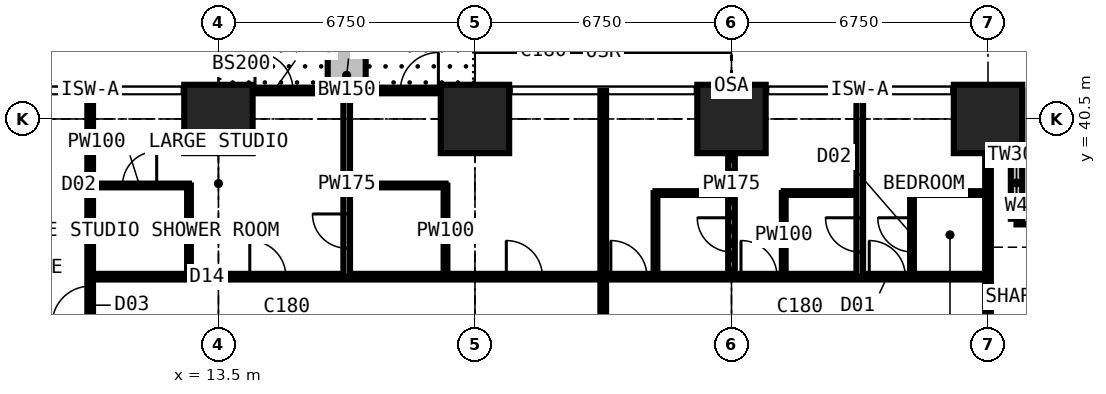
"""IFC4 building model, lengths in metres.
Left out: names, types, materials, properties, quantities, classifications, styles, units other than length and angle.
Written with IfcOpenShell. Run it as: python <this file> out.ifc"""

import sys

from ifc_helpers import new_model, si_unit, direction, frame, frame_2d, origin, origin_2d, place, context, subcontext, project, spatial, rectangle, extrude, element, fill, save


model = new_model("IFC4")
c1 = context("Model", 3, precision=1e-05, world=origin(), true_north=direction((0.0, 1.0)))
c2 = subcontext(c1, "Body", "Model", "MODEL_VIEW")
j1 = project(units=[si_unit("LENGTHUNIT", "METRE"), si_unit("PLANEANGLEUNIT", "RADIAN")], contexts=[c1])
p1 = place(None, origin())
s1 = spatial("IfcSite", under=j1, at=p1, CompositionType="ELEMENT")
p2 = place(p1, origin())
s2 = spatial("IfcBuilding", under=s1, at=p2, CompositionType="ELEMENT")
p3 = place(p2, frame((0.0, 0.0, 54.0)))
s3 = spatial("IfcBuildingStorey", under=s2, at=p3, CompositionType="ELEMENT", Elevation=54.0)
for number, where, z_axis, x_axis in (
    (1, (13.5, 40.5, 0.0), (0.0, 0.0, 1.0), (1.0, 0.0, 0.0)),
    (2, (20.25, 40.5, 0.0), (0.0, 0.0, 1.0), (1.0, 0.0, 0.0)),
    (3, (27.0, 40.5, 0.0), (0.0, 0.0, 1.0), (1.0, 0.0, 0.0)),
    (4, (33.75, 40.5, 0.0), (0.0, 0.0, 1.0), (1.0, 0.0, 0.0)),
):
    element("IfcColumn", number, at=place(p3, frame(where, z_axis=z_axis, x_axis=x_axis)), inside=s3, PredefinedType="COLUMN", context=c2, shape_type="SweptSolid", body=[
        extrude(rectangle(XDim=1.8, YDim=1.8, at=origin_2d()), origin(), (0.0, 0.0, 1.0), 3.6),
    ])
p4 = place(p3, frame((37.875, 37.875, 0.0), z_axis=(0.0, 0.0, 1.0), x_axis=(-1.0, 0.0, 0.0)))
e5 = element("IfcWall", 5, at=p4, inside=s3, PredefinedType="SOLIDWALL", context=c2, shape_type="SweptSolid", body=[
    extrude(rectangle(XDim=3.375, YDim=0.3, at=frame_2d((1.688, 0.0))), origin(), (0.0, 0.0, 1.0), 3.375),
])
p5 = place(p4, frame((0.788, 0.0, 0.6)))
e6 = element("IfcOpeningElement", 6, at=p5, cuts=e5, PredefinedType="OPENING", context=c2, shape_type="SweptSolid", body=[
    extrude(rectangle(XDim=1.8, YDim=2.1, at=frame_2d((0.9, 1.05))), frame((0.0, 0.16, 0.0), z_axis=(0.0, -1.0, 0.0), x_axis=(1.0, 0.0, 0.0)), (0.0, 0.0, 1.0), 0.32),
])
p6 = place(p3, frame((34.5, 37.875, 0.0), z_axis=(0.0, 0.0, 1.0), x_axis=(0.0, 1.0, 0.0)))
e7 = element("IfcWall", 7, at=p6, inside=s3, PredefinedType="SOLIDWALL", context=c2, shape_type="SweptSolid", body=[
    extrude(rectangle(XDim=3.375, YDim=0.3, at=frame_2d((1.688, 0.0))), origin(), (0.0, 0.0, 1.0), 3.375),
])
p7 = place(p6, frame((0.343, 0.0, 0.9)))
e8 = element("IfcOpeningElement", 8, at=p7, cuts=e7, PredefinedType="OPENING", context=c2, shape_type="SweptSolid", body=[
    extrude(rectangle(XDim=1.2, YDim=1.8, at=frame_2d((0.6, 0.9))), frame((0.0, 0.16, 0.0), z_axis=(0.0, -1.0, 0.0), x_axis=(1.0, 0.0, 0.0)), (0.0, 0.0, 1.0), 0.32),
])
p8 = place(p3, frame((13.5, 41.25, 0.0), z_axis=(0.0, 0.0, 1.0), x_axis=(1.0, 0.0, 0.0)))
e9 = element("IfcWall", 9, at=p8, inside=s3, PredefinedType="SOLIDWALL", context=c2, shape_type="SweptSolid", body=[
    extrude(rectangle(XDim=6.75, YDim=0.15, at=frame_2d((3.375, 0.0))), origin(), (0.0, 0.0, 1.0), 3.375),
])
p9 = place(p8, frame((0.962, 0.0, 0.0)))
e10 = element("IfcOpeningElement", 10, at=p9, cuts=e9, PredefinedType="OPENING", context=c2, shape_type="SweptSolid", body=[
    extrude(rectangle(XDim=1.0, YDim=2.2, at=frame_2d((0.5, 1.1))), frame((0.0, 0.085, 0.0), z_axis=(0.0, -1.0, 0.0), x_axis=(1.0, 0.0, 0.0)), (0.0, 0.0, 1.0), 0.17),
])
p10 = place(p8, frame((2.025, 0.0, 0.9)))
e11 = element("IfcOpeningElement", 11, at=p10, cuts=e9, PredefinedType="OPENING", context=c2, shape_type="SweptSolid", body=[
    extrude(rectangle(XDim=1.2, YDim=1.8, at=frame_2d((0.6, 0.9))), frame((0.0, 0.085, 0.0), z_axis=(0.0, -1.0, 0.0), x_axis=(1.0, 0.0, 0.0)), (0.0, 0.0, 1.0), 0.17),
])
p11 = place(p8, frame((4.788, 0.0, 0.0)))
e12 = element("IfcOpeningElement", 12, at=p11, cuts=e9, PredefinedType="OPENING", context=c2, shape_type="SweptSolid", body=[
    extrude(rectangle(XDim=1.0, YDim=2.2, at=frame_2d((0.5, 1.1))), frame((0.0, 0.085, 0.0), z_axis=(0.0, -1.0, 0.0), x_axis=(1.0, 0.0, 0.0)), (0.0, 0.0, 1.0), 0.17),
])
p12 = place(p8, frame((3.525, 0.0, 0.9)))
e13 = element("IfcOpeningElement", 13, at=p12, cuts=e9, PredefinedType="OPENING", context=c2, shape_type="SweptSolid", body=[
    extrude(rectangle(XDim=1.2, YDim=1.8, at=frame_2d((0.6, 0.9))), frame((0.0, 0.085, 0.0), z_axis=(0.0, -1.0, 0.0), x_axis=(1.0, 0.0, 0.0)), (0.0, 0.0, 1.0), 0.17),
])
p13 = place(p3, frame((16.875, 41.35, 0.0), z_axis=(0.0, 0.0, 1.0), x_axis=(0.0, 1.0, 0.0)))
e14 = element("IfcWall", 14, at=p13, inside=s3, PredefinedType="USERDEFINED", context=c2, shape_type="SweptSolid", body=[
    extrude(rectangle(XDim=2.2, YDim=1.0, at=frame_2d((1.1, 0.0))), origin(), (0.0, 0.0, 1.0), 0.9),
])
p14 = place(p3, frame((10.125, 30.375, 0.0), z_axis=(0.0, 0.0, 1.0), x_axis=(0.0, 1.0, 0.0)))
e15 = element("IfcWall", 15, at=p14, inside=s3, PredefinedType="PARTITIONING", context=c2, shape_type="SweptSolid", body=[
    extrude(rectangle(XDim=10.859, YDim=0.15, at=frame_2d((5.429, 0.0))), origin(), (0.0, 0.0, 1.0), 3.375),
])
p15 = place(p14, frame((4.725, 0.0, 0.0)))
e16 = element("IfcOpeningElement", 16, at=p15, cuts=e15, PredefinedType="OPENING", context=c2, shape_type="SweptSolid", body=[
    extrude(rectangle(XDim=1.0, YDim=2.2, at=frame_2d((0.5, 1.1))), frame((0.0, 0.085, 0.0), z_axis=(0.0, -1.0, 0.0), x_axis=(1.0, 0.0, 0.0)), (0.0, 0.0, 1.0), 0.17),
])
p16 = place(p3, frame((10.125, 36.35, 0.0), z_axis=(0.0, 0.0, 1.0), x_axis=(1.0, 0.0, 0.0)))
e17 = element("IfcWall", 17, at=p16, inside=s3, PredefinedType="PARTITIONING", context=c2, shape_type="SweptSolid", body=[
    extrude(rectangle(XDim=23.625, YDim=0.15, at=frame_2d((11.812, 0.0))), origin(), (0.0, 0.0, 1.0), 3.375),
])
p17 = place(p16, frame((20.5, 0.0, 0.0)))
e18 = element("IfcOpeningElement", 18, at=p17, cuts=e17, PredefinedType="OPENING", context=c2, shape_type="SweptSolid", body=[
    extrude(rectangle(XDim=0.95, YDim=2.2, at=frame_2d((0.475, 1.1))), frame((0.0, 0.085, 0.0), z_axis=(0.0, -1.0, 0.0), x_axis=(1.0, 0.0, 0.0)), (0.0, 0.0, 1.0), 0.17),
])
p18 = place(p16, frame((17.125, 0.0, 0.0)))
e19 = element("IfcOpeningElement", 19, at=p18, cuts=e17, PredefinedType="OPENING", context=c2, shape_type="SweptSolid", body=[
    extrude(rectangle(XDim=0.95, YDim=2.2, at=frame_2d((0.475, 1.1))), frame((0.0, 0.085, 0.0), z_axis=(0.0, -1.0, 0.0), x_axis=(1.0, 0.0, 0.0)), (0.0, 0.0, 1.0), 0.17),
])
p19 = place(p16, frame((13.7, 0.0, 0.0)))
e20 = element("IfcOpeningElement", 20, at=p19, cuts=e17, PredefinedType="OPENING", context=c2, shape_type="SweptSolid", body=[
    extrude(rectangle(XDim=0.95, YDim=2.2, at=frame_2d((0.475, 1.1))), frame((0.0, 0.085, 0.0), z_axis=(0.0, -1.0, 0.0), x_axis=(1.0, 0.0, 0.0)), (0.0, 0.0, 1.0), 0.17),
])
p20 = place(p16, frame((4.2, 0.0, 0.0)))
e21 = element("IfcOpeningElement", 21, at=p20, cuts=e17, PredefinedType="OPENING", context=c2, shape_type="SweptSolid", body=[
    extrude(rectangle(XDim=0.95, YDim=2.2, at=frame_2d((0.475, 1.1))), frame((0.0, 0.085, 0.0), z_axis=(0.0, -1.0, 0.0), x_axis=(1.0, 0.0, 0.0)), (0.0, 0.0, 1.0), 0.17),
])
p21 = place(p16, frame((10.95, 0.0, 0.0)))
e22 = element("IfcOpeningElement", 22, at=p21, cuts=e17, PredefinedType="OPENING", context=c2, shape_type="SweptSolid", body=[
    extrude(rectangle(XDim=0.95, YDim=2.2, at=frame_2d((0.475, 1.1))), frame((0.0, 0.085, 0.0), z_axis=(0.0, -1.0, 0.0), x_axis=(1.0, 0.0, 0.0)), (0.0, 0.0, 1.0), 0.17),
])
p22 = place(p3, frame((10.125, 38.75, 0.0), z_axis=(0.0, 0.0, 1.0), x_axis=(1.0, 0.0, 0.0)))
e23 = element("IfcWall", 23, at=p22, inside=s3, PredefinedType="PARTITIONING", context=c2, shape_type="SweptSolid", body=[
    extrude(rectangle(XDim=2.6, YDim=0.1, at=frame_2d((1.3, 0.0))), origin(), (0.0, 0.0, 1.0), 3.375),
])
p23 = place(p22, frame((0.85, 0.0, 0.0)))
e24 = element("IfcOpeningElement", 24, at=p23, cuts=e23, PredefinedType="OPENING", context=c2, shape_type="SweptSolid", body=[
    extrude(rectangle(XDim=0.9, YDim=2.2, at=frame_2d((0.45, 1.1))), frame((0.0, 0.06, 0.0), z_axis=(0.0, -1.0, 0.0), x_axis=(1.0, 0.0, 0.0)), (0.0, 0.0, 1.0), 0.12),
])
p24 = place(p3, frame((12.725, 36.35, 0.0), z_axis=(0.0, 0.0, 1.0), x_axis=(0.0, 1.0, 0.0)))
e25 = element("IfcWall", 25, at=p24, inside=s3, PredefinedType="PARTITIONING", context=c2, shape_type="SweptSolid", body=[
    extrude(rectangle(XDim=2.4, YDim=0.1, at=frame_2d((1.2, 0.0))), origin(), (0.0, 0.0, 1.0), 3.375),
])
p25 = place(p3, frame((16.875, 36.35, 0.0), z_axis=(0.0, 0.0, 1.0), x_axis=(0.0, 1.0, 0.0)))
e26 = element("IfcWall", 26, at=p25, inside=s3, PredefinedType="PARTITIONING", context=c2, shape_type="SweptSolid", body=[
    extrude(rectangle(XDim=4.884, YDim=0.175, at=frame_2d((2.442, 0.0))), origin(), (0.0, 0.0, 1.0), 3.375),
])
p26 = place(p25, frame((0.75, 0.0, 0.0)))
e27 = element("IfcOpeningElement", 27, at=p26, cuts=e26, PredefinedType="OPENING", context=c2, shape_type="SweptSolid", body=[
    extrude(rectangle(XDim=0.9, YDim=2.2, at=frame_2d((0.45, 1.1))), frame((0.0, 0.097, 0.0), z_axis=(0.0, -1.0, 0.0), x_axis=(1.0, 0.0, 0.0)), (0.0, 0.0, 1.0), 0.195),
])
p27 = place(p3, frame((16.875, 38.75, 0.0), z_axis=(0.0, 0.0, 1.0), x_axis=(1.0, 0.0, 0.0)))
e28 = element("IfcWall", 28, at=p27, inside=s3, PredefinedType="PARTITIONING", context=c2, shape_type="SweptSolid", body=[
    extrude(rectangle(XDim=2.6, YDim=0.1, at=frame_2d((1.3, 0.0))), origin(), (0.0, 0.0, 1.0), 3.375),
])
p28 = place(p3, frame((19.475, 36.35, 0.0), z_axis=(0.0, 0.0, 1.0), x_axis=(0.0, 1.0, 0.0)))
e29 = element("IfcWall", 29, at=p28, inside=s3, PredefinedType="PARTITIONING", context=c2, shape_type="SweptSolid", body=[
    extrude(rectangle(XDim=2.4, YDim=0.1, at=frame_2d((1.2, 0.0))), origin(), (0.0, 0.0, 1.0), 3.375),
])
p29 = place(p3, frame((23.625, 29.2, 0.0), z_axis=(0.0, 0.0, 1.0), x_axis=(0.0, 1.0, 0.0)))
e30 = element("IfcWall", 30, at=p29, inside=s3, PredefinedType="PARTITIONING", context=c2, shape_type="SweptSolid", body=[
    extrude(rectangle(XDim=12.034, YDim=0.15, at=frame_2d((6.017, 0.0))), origin(), (0.0, 0.0, 1.0), 3.375),
])
p30 = place(p3, frame((25.0, 36.35, 0.0), z_axis=(0.0, 0.0, 1.0), x_axis=(0.0, 1.0, 0.0)))
e31 = element("IfcWall", 31, at=p30, inside=s3, PredefinedType="PARTITIONING", context=c2, shape_type="SweptSolid", body=[
    extrude(rectangle(XDim=2.2, YDim=0.1, at=frame_2d((1.1, 0.0))), origin(), (0.0, 0.0, 1.0), 3.375),
])
p31 = place(p3, frame((25.0, 38.55, 0.0), z_axis=(0.0, 0.0, 1.0), x_axis=(1.0, 0.0, 0.0)))
e32 = element("IfcWall", 32, at=p31, inside=s3, PredefinedType="PARTITIONING", context=c2, shape_type="SweptSolid", body=[
    extrude(rectangle(XDim=2.0, YDim=0.1, at=frame_2d((1.0, 0.0))), origin(), (0.0, 0.0, 1.0), 3.375),
])
p32 = place(p3, frame((27.0, 36.35, 0.0), z_axis=(0.0, 0.0, 1.0), x_axis=(0.0, 1.0, 0.0)))
e33 = element("IfcWall", 33, at=p32, inside=s3, PredefinedType="PARTITIONING", context=c2, shape_type="SweptSolid", body=[
    extrude(rectangle(XDim=4.884, YDim=0.175, at=frame_2d((2.442, 0.0))), origin(), (0.0, 0.0, 1.0), 2.61),
])
p33 = place(p32, frame((0.65, 0.0, 0.0)))
e34 = element("IfcOpeningElement", 34, at=p33, cuts=e33, PredefinedType="OPENING", context=c2, shape_type="SweptSolid", body=[
    extrude(rectangle(XDim=0.9, YDim=2.2, at=frame_2d((0.45, 1.1))), frame((0.0, 0.097, 0.0), z_axis=(0.0, -1.0, 0.0), x_axis=(1.0, 0.0, 0.0)), (0.0, 0.0, 1.0), 0.195),
])
p34 = place(p3, frame((28.375, 36.35, 0.0), z_axis=(0.0, 0.0, 1.0), x_axis=(0.0, 1.0, 0.0)))
e35 = element("IfcWall", 35, at=p34, inside=s3, PredefinedType="PARTITIONING", context=c2, shape_type="SweptSolid", body=[
    extrude(rectangle(XDim=2.2, YDim=0.1, at=frame_2d((1.1, 0.0))), origin(), (0.0, 0.0, 1.0), 3.375),
])
p35 = place(p3, frame((28.375, 38.55, 0.0), z_axis=(0.0, 0.0, 1.0), x_axis=(1.0, 0.0, 0.0)))
e36 = element("IfcWall", 36, at=p35, inside=s3, PredefinedType="PARTITIONING", context=c2, shape_type="SweptSolid", body=[
    extrude(rectangle(XDim=2.0, YDim=0.1, at=frame_2d((1.0, 0.0))), origin(), (0.0, 0.0, 1.0), 3.375),
])
p36 = place(p3, frame((30.375, 36.35, 0.0), z_axis=(0.0, 0.0, 1.0), x_axis=(0.0, 1.0, 0.0)))
e37 = element("IfcWall", 37, at=p36, inside=s3, PredefinedType="PARTITIONING", context=c2, shape_type="SweptSolid", body=[
    extrude(rectangle(XDim=4.884, YDim=0.175, at=frame_2d((2.442, 0.0))), origin(), (0.0, 0.0, 1.0), 3.375),
])
p37 = place(p36, frame((0.65, 0.0, 0.0)))
e38 = element("IfcOpeningElement", 38, at=p37, cuts=e37, PredefinedType="OPENING", context=c2, shape_type="SweptSolid", body=[
    extrude(rectangle(XDim=0.9, YDim=2.2, at=frame_2d((0.45, 1.1))), frame((0.0, 0.097, 0.0), z_axis=(0.0, -1.0, 0.0), x_axis=(1.0, 0.0, 0.0)), (0.0, 0.0, 1.0), 0.195),
])
p38 = place(p3, frame((31.75, 36.35, 0.0), z_axis=(0.0, 0.0, 1.0), x_axis=(0.0, 1.0, 0.0)))
e39 = element("IfcWall", 39, at=p38, inside=s3, PredefinedType="PARTITIONING", context=c2, shape_type="SweptSolid", body=[
    extrude(rectangle(XDim=2.2, YDim=0.1, at=frame_2d((1.1, 0.0))), origin(), (0.0, 0.0, 1.0), 3.375),
])
p39 = place(p38, frame((0.65, 0.0, 0.0)))
e40 = element("IfcOpeningElement", 40, at=p39, cuts=e39, PredefinedType="OPENING", context=c2, shape_type="SweptSolid", body=[
    extrude(rectangle(XDim=0.9, YDim=2.2, at=frame_2d((0.45, 1.1))), frame((0.0, 0.06, 0.0), z_axis=(0.0, -1.0, 0.0), x_axis=(1.0, 0.0, 0.0)), (0.0, 0.0, 1.0), 0.12),
])
p40 = place(p3, frame((31.75, 38.55, 0.0), z_axis=(0.0, 0.0, 1.0), x_axis=(1.0, 0.0, 0.0)))
e41 = element("IfcWall", 41, at=p40, inside=s3, PredefinedType="PARTITIONING", context=c2, shape_type="SweptSolid", body=[
    extrude(rectangle(XDim=2.0, YDim=0.1, at=frame_2d((1.0, 0.0))), origin(), (0.0, 0.0, 1.0), 3.375),
])
p41 = place(p3, frame((33.75, 30.375, 0.0), z_axis=(0.0, 0.0, 1.0), x_axis=(0.0, 1.0, 0.0)))
e42 = element("IfcWall", 42, at=p41, inside=s3, PredefinedType="PARTITIONING", context=c2, shape_type="SweptSolid", body=[
    extrude(rectangle(XDim=10.859, YDim=0.15, at=frame_2d((5.429, 0.0))), origin(), (0.0, 0.0, 1.0), 2.877),
])
p42 = place(p41, frame((1.45, 0.0, 0.0)))
e43 = element("IfcOpeningElement", 43, at=p42, cuts=e42, PredefinedType="OPENING", context=c2, shape_type="SweptSolid", body=[
    extrude(rectangle(XDim=1.0, YDim=2.2, at=frame_2d((0.5, 1.1))), frame((0.0, 0.085, 0.0), z_axis=(0.0, -1.0, 0.0), x_axis=(1.0, 0.0, 0.0)), (0.0, 0.0, 1.0), 0.17),
])
p43 = place(p7, origin())
e44 = element("IfcWindow", 44, at=p43, inside=s3, PartitioningType="SINGLE_PANEL", PredefinedType="WINDOW", context=c2, shape_type="SweptSolid", body=[
    extrude(rectangle(XDim=1.2, YDim=1.8, at=frame_2d((0.6, 0.9))), frame((0.0, 0.03, 0.0), z_axis=(0.0, -1.0, 0.0), x_axis=(1.0, 0.0, 0.0)), (0.0, 0.0, 1.0), 0.06),
])
fill(e8, e44)
p44 = place(p9, origin())
e45 = element("IfcDoor", 45, at=p44, inside=s3, OperationType="SINGLE_SWING_LEFT", PredefinedType="DOOR", context=c2, shape_type="SweptSolid", body=[
    extrude(rectangle(XDim=1.0, YDim=2.2, at=frame_2d((0.5, 1.1))), frame((0.0, 0.025, 0.0), z_axis=(0.0, -1.0, 0.0), x_axis=(1.0, 0.0, 0.0)), (0.0, 0.0, 1.0), 0.05),
])
fill(e10, e45)
p45 = place(p10, origin())
e46 = element("IfcWindow", 46, at=p45, inside=s3, PartitioningType="SINGLE_PANEL", PredefinedType="WINDOW", context=c2, shape_type="SweptSolid", body=[
    extrude(rectangle(XDim=1.2, YDim=1.8, at=frame_2d((0.6, 0.9))), frame((0.0, 0.03, 0.0), z_axis=(0.0, -1.0, 0.0), x_axis=(1.0, 0.0, 0.0)), (0.0, 0.0, 1.0), 0.06),
])
fill(e11, e46)
p46 = place(p11, origin())
e47 = element("IfcDoor", 47, at=p46, inside=s3, OperationType="SINGLE_SWING_RIGHT", PredefinedType="DOOR", context=c2, shape_type="SweptSolid", body=[
    extrude(rectangle(XDim=1.0, YDim=2.2, at=frame_2d((0.5, 1.1))), frame((0.0, 0.025, 0.0), z_axis=(0.0, -1.0, 0.0), x_axis=(1.0, 0.0, 0.0)), (0.0, 0.0, 1.0), 0.05),
])
fill(e12, e47)
p47 = place(p12, origin())
e48 = element("IfcWindow", 48, at=p47, inside=s3, PartitioningType="SINGLE_PANEL", PredefinedType="WINDOW", context=c2, shape_type="SweptSolid", body=[
    extrude(rectangle(XDim=1.2, YDim=1.8, at=frame_2d((0.6, 0.9))), frame((0.0, 0.03, 0.0), z_axis=(0.0, -1.0, 0.0), x_axis=(1.0, 0.0, 0.0)), (0.0, 0.0, 1.0), 0.06),
])
fill(e13, e48)
p48 = place(p17, origin())
e49 = element("IfcDoor", 49, at=p48, inside=s3, OperationType="SINGLE_SWING_LEFT", PredefinedType="DOOR", context=c2, shape_type="SweptSolid", body=[
    extrude(rectangle(XDim=0.95, YDim=2.2, at=frame_2d((0.475, 1.1))), frame((0.0, 0.025, 0.0), z_axis=(0.0, -1.0, 0.0), x_axis=(1.0, 0.0, 0.0)), (0.0, 0.0, 1.0), 0.05),
])
fill(e18, e49)
p49 = place(p39, origin())
e50 = element("IfcDoor", 50, at=p49, inside=s3, OperationType="SINGLE_SWING_RIGHT", PredefinedType="DOOR", context=c2, shape_type="SweptSolid", body=[
    extrude(rectangle(XDim=0.9, YDim=2.2, at=frame_2d((0.45, 1.1))), frame((0.0, 0.025, 0.0), z_axis=(0.0, -1.0, 0.0), x_axis=(1.0, 0.0, 0.0)), (0.0, 0.0, 1.0), 0.05),
])
fill(e40, e50)
p50 = place(p18, origin())
e51 = element("IfcDoor", 51, at=p50, inside=s3, OperationType="SINGLE_SWING_LEFT", PredefinedType="DOOR", context=c2, shape_type="SweptSolid", body=[
    extrude(rectangle(XDim=0.95, YDim=2.2, at=frame_2d((0.475, 1.1))), frame((0.0, 0.025, 0.0), z_axis=(0.0, -1.0, 0.0), x_axis=(1.0, 0.0, 0.0)), (0.0, 0.0, 1.0), 0.05),
])
fill(e19, e51)
p51 = place(p37, origin())
e52 = element("IfcDoor", 52, at=p51, inside=s3, OperationType="SINGLE_SWING_RIGHT", PredefinedType="DOOR", context=c2, shape_type="SweptSolid", body=[
    extrude(rectangle(XDim=0.9, YDim=2.2, at=frame_2d((0.45, 1.1))), frame((0.0, 0.025, 0.0), z_axis=(0.0, -1.0, 0.0), x_axis=(1.0, 0.0, 0.0)), (0.0, 0.0, 1.0), 0.05),
])
fill(e38, e52)
p52 = place(p19, origin())
e53 = element("IfcDoor", 53, at=p52, inside=s3, OperationType="SINGLE_SWING_LEFT", PredefinedType="DOOR", context=c2, shape_type="SweptSolid", body=[
    extrude(rectangle(XDim=0.95, YDim=2.2, at=frame_2d((0.475, 1.1))), frame((0.0, 0.025, 0.0), z_axis=(0.0, -1.0, 0.0), x_axis=(1.0, 0.0, 0.0)), (0.0, 0.0, 1.0), 0.05),
])
fill(e20, e53)
p53 = place(p33, origin())
e54 = element("IfcDoor", 54, at=p53, inside=s3, OperationType="SINGLE_SWING_RIGHT", PredefinedType="DOOR", context=c2, shape_type="SweptSolid", body=[
    extrude(rectangle(XDim=0.9, YDim=2.2, at=frame_2d((0.45, 1.1))), frame((0.0, 0.025, 0.0), z_axis=(0.0, -1.0, 0.0), x_axis=(1.0, 0.0, 0.0)), (0.0, 0.0, 1.0), 0.05),
])
fill(e34, e54)
p54 = place(p20, origin())
e55 = element("IfcDoor", 55, at=p54, inside=s3, OperationType="SINGLE_SWING_LEFT", PredefinedType="DOOR", context=c2, shape_type="SweptSolid", body=[
    extrude(rectangle(XDim=0.95, YDim=2.2, at=frame_2d((0.475, 1.1))), frame((0.0, 0.025, 0.0), z_axis=(0.0, -1.0, 0.0), x_axis=(1.0, 0.0, 0.0)), (0.0, 0.0, 1.0), 0.05),
])
fill(e21, e55)
p55 = place(p23, origin())
e56 = element("IfcDoor", 56, at=p55, inside=s3, OperationType="SINGLE_SWING_RIGHT", PredefinedType="DOOR", context=c2, shape_type="SweptSolid", body=[
    extrude(rectangle(XDim=0.9, YDim=2.2, at=frame_2d((0.45, 1.1))), frame((0.0, 0.025, 0.0), z_axis=(0.0, -1.0, 0.0), x_axis=(1.0, 0.0, 0.0)), (0.0, 0.0, 1.0), 0.05),
])
fill(e24, e56)
p56 = place(p21, origin())
e57 = element("IfcDoor", 57, at=p56, inside=s3, OperationType="SINGLE_SWING_LEFT", PredefinedType="DOOR", context=c2, shape_type="SweptSolid", body=[
    extrude(rectangle(XDim=0.95, YDim=2.2, at=frame_2d((0.475, 1.1))), frame((0.0, 0.025, 0.0), z_axis=(0.0, -1.0, 0.0), x_axis=(1.0, 0.0, 0.0)), (0.0, 0.0, 1.0), 0.05),
])
fill(e22, e57)
p57 = place(p26, origin())
e58 = element("IfcDoor", 58, at=p57, inside=s3, OperationType="SINGLE_SWING_RIGHT", PredefinedType="DOOR", context=c2, shape_type="SweptSolid", body=[
    extrude(rectangle(XDim=0.9, YDim=2.2, at=frame_2d((0.45, 1.1))), frame((0.0, 0.025, 0.0), z_axis=(0.0, -1.0, 0.0), x_axis=(1.0, 0.0, 0.0)), (0.0, 0.0, 1.0), 0.05),
])
fill(e27, e58)
p58 = place(p15, origin())
e59 = element("IfcDoor", 59, at=p58, inside=s3, OperationType="SINGLE_SWING_LEFT", PredefinedType="DOOR", context=c2, shape_type="SweptSolid", body=[
    extrude(rectangle(XDim=1.0, YDim=2.2, at=frame_2d((0.5, 1.1))), frame((0.0, 0.025, 0.0), z_axis=(0.0, -1.0, 0.0), x_axis=(1.0, 0.0, 0.0)), (0.0, 0.0, 1.0), 0.05),
])
fill(e16, e59)
save(model, sys.argv[1])
